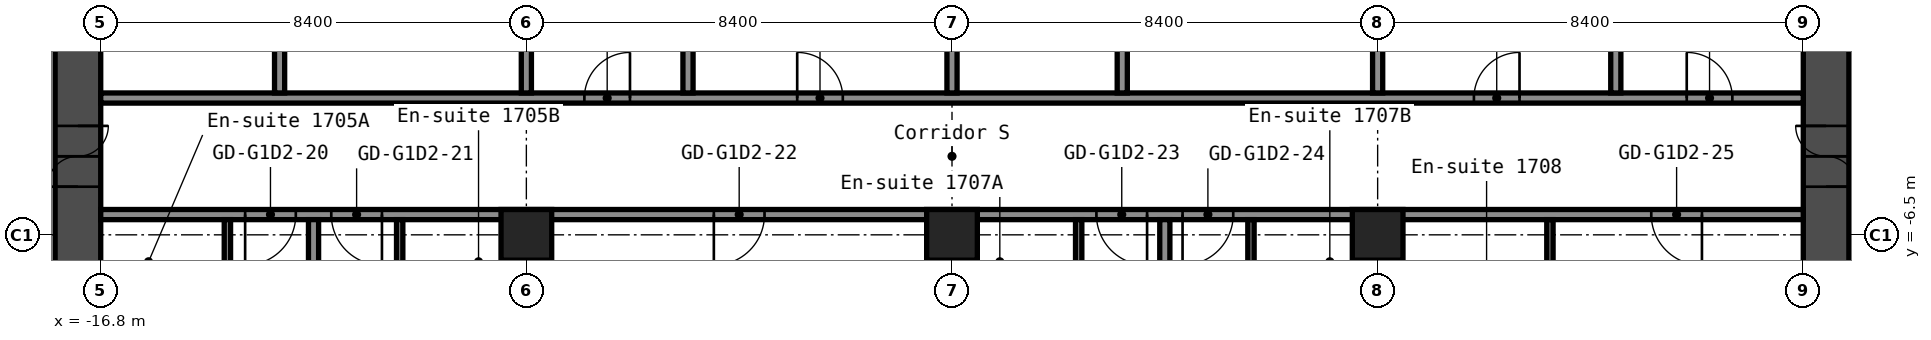
"""IFC4 building model, lengths in metres.
Left out: names, types, materials, properties, quantities, classifications, styles, units other than length and angle.
Written with IfcOpenShell. Run it as: python <this file> out.ifc"""

import sys

from ifc_helpers import new_model, si_unit, direction, frame, frame_2d, origin, origin_2d, place, context, subcontext, project, spatial, rectangle, hollow_rectangle, extrude, element, fill, save


model = new_model("IFC4")
c1 = context("Model", 3, precision=1e-05, world=origin(), true_north=direction((0.0, 1.0)))
c2 = subcontext(c1, "Body", "Model", "MODEL_VIEW")
j1 = project(units=[si_unit("LENGTHUNIT", "METRE"), si_unit("PLANEANGLEUNIT", "RADIAN")], contexts=[c1])
p1 = place(None, origin())
s1 = spatial("IfcSite", under=j1, at=p1, CompositionType="ELEMENT")
p2 = place(p1, origin())
s2 = spatial("IfcBuilding", under=s1, at=p2, CompositionType="ELEMENT")
p3 = place(p2, frame((0.0, 0.0, 61.4)))
s3 = spatial("IfcBuildingStorey", under=s2, at=p3, CompositionType="ELEMENT", Elevation=61.4)
for number, where, z_axis, x_axis in (
    (1, (-8.4, -6.5, 0.0), (0.0, 0.0, 1.0), (1.0, 0.0, 0.0)),
    (2, (0.0, -6.5, 0.0), (0.0, 0.0, 1.0), (1.0, 0.0, 0.0)),
    (3, (8.4, -6.5, 0.0), (0.0, 0.0, 1.0), (1.0, 0.0, 0.0)),
):
    element("IfcColumn", number, at=place(p3, frame(where, z_axis=z_axis, x_axis=x_axis)), inside=s3, PredefinedType="COLUMN", context=c2, shape_type="SweptSolid", body=[
        extrude(hollow_rectangle(XDim=1.0, YDim=1.0, WallThickness=0.04, at=origin_2d()), origin(), (0.0, 0.0, 1.0), 2.9),
    ])
p4 = place(p3, frame((-17.25, -8.4, 0.0), z_axis=(0.0, 0.0, 1.0), x_axis=(0.0, 1.0, 0.0)))
e4 = element("IfcWall", 4, at=p4, inside=s3, PredefinedType="SHEAR", context=c2, shape_type="SweptSolid", body=[
    extrude(rectangle(XDim=16.8, YDim=0.9, at=frame_2d((8.4, 0.0))), origin(), (0.0, 0.0, 1.0), 2.9),
])
p5 = place(p4, frame((12.75, 0.0, 0.0)))
e5 = element("IfcOpeningElement", 5, at=p5, cuts=e4, PredefinedType="OPENING", context=c2, shape_type="SweptSolid", body=[
    extrude(rectangle(XDim=1.2, YDim=2.1, at=frame_2d((0.6, 1.05))), frame((0.0, 0.46, 0.0), z_axis=(0.0, -1.0, 0.0), x_axis=(1.0, 0.0, 0.0)), (0.0, 0.0, 1.0), 0.92),
])
p6 = place(p4, frame((2.85, 0.0, 0.0)))
e6 = element("IfcOpeningElement", 6, at=p6, cuts=e4, PredefinedType="OPENING", context=c2, shape_type="SweptSolid", body=[
    extrude(rectangle(XDim=1.2, YDim=2.1, at=frame_2d((0.6, 1.05))), frame((0.0, 0.46, 0.0), z_axis=(0.0, -1.0, 0.0), x_axis=(1.0, 0.0, 0.0)), (0.0, 0.0, 1.0), 0.92),
])
p7 = place(p3, frame((17.25, -8.4, 0.0), z_axis=(0.0, 0.0, 1.0), x_axis=(0.0, 1.0, 0.0)))
e7 = element("IfcWall", 7, at=p7, inside=s3, PredefinedType="SHEAR", context=c2, shape_type="SweptSolid", body=[
    extrude(rectangle(XDim=16.8, YDim=0.9, at=frame_2d((8.4, 0.0))), origin(), (0.0, 0.0, 1.0), 2.9),
])
p8 = place(p7, frame((12.75, 0.0, 0.0)))
e8 = element("IfcOpeningElement", 8, at=p8, cuts=e7, PredefinedType="OPENING", context=c2, shape_type="SweptSolid", body=[
    extrude(rectangle(XDim=1.2, YDim=2.1, at=frame_2d((0.6, 1.05))), frame((0.0, 0.46, 0.0), z_axis=(0.0, -1.0, 0.0), x_axis=(1.0, 0.0, 0.0)), (0.0, 0.0, 1.0), 0.92),
])
p9 = place(p7, frame((2.85, 0.0, 0.0)))
e9 = element("IfcOpeningElement", 9, at=p9, cuts=e7, PredefinedType="OPENING", context=c2, shape_type="SweptSolid", body=[
    extrude(rectangle(XDim=1.2, YDim=2.1, at=frame_2d((0.6, 1.05))), frame((0.0, 0.46, 0.0), z_axis=(0.0, -1.0, 0.0), x_axis=(1.0, 0.0, 0.0)), (0.0, 0.0, 1.0), 0.92),
])
p10 = place(p3, frame((-16.8, -6.1, 0.0), z_axis=(0.0, 0.0, 1.0), x_axis=(1.0, 0.0, 0.0)))
e10 = element("IfcWall", 10, at=p10, inside=s3, PredefinedType="PARTITIONING", context=c2, shape_type="SweptSolid", body=[
    extrude(rectangle(XDim=33.6, YDim=0.2, at=frame_2d((16.8, 0.0))), origin(), (0.0, 0.0, 1.0), 2.9),
])
p11 = place(p10, frame((2.85, 0.0, 0.0)))
e11 = element("IfcOpeningElement", 11, at=p11, cuts=e10, PredefinedType="OPENING", context=c2, shape_type="SweptSolid", body=[
    extrude(rectangle(XDim=1.0, YDim=2.1, at=frame_2d((0.5, 1.05))), frame((0.0, 0.11, 0.0), z_axis=(0.0, -1.0, 0.0), x_axis=(1.0, 0.0, 0.0)), (0.0, 0.0, 1.0), 0.22),
])
p12 = place(p10, frame((4.55, 0.0, 0.0)))
e12 = element("IfcOpeningElement", 12, at=p12, cuts=e10, PredefinedType="OPENING", context=c2, shape_type="SweptSolid", body=[
    extrude(rectangle(XDim=1.0, YDim=2.1, at=frame_2d((0.5, 1.05))), frame((0.0, 0.11, 0.0), z_axis=(0.0, -1.0, 0.0), x_axis=(1.0, 0.0, 0.0)), (0.0, 0.0, 1.0), 0.22),
])
p13 = place(p10, frame((12.1, 0.0, 0.0)))
e13 = element("IfcOpeningElement", 13, at=p13, cuts=e10, PredefinedType="OPENING", context=c2, shape_type="SweptSolid", body=[
    extrude(rectangle(XDim=1.0, YDim=2.1, at=frame_2d((0.5, 1.05))), frame((0.0, 0.11, 0.0), z_axis=(0.0, -1.0, 0.0), x_axis=(1.0, 0.0, 0.0)), (0.0, 0.0, 1.0), 0.22),
])
p14 = place(p10, frame((19.65, 0.0, 0.0)))
e14 = element("IfcOpeningElement", 14, at=p14, cuts=e10, PredefinedType="OPENING", context=c2, shape_type="SweptSolid", body=[
    extrude(rectangle(XDim=1.0, YDim=2.1, at=frame_2d((0.5, 1.05))), frame((0.0, 0.11, 0.0), z_axis=(0.0, -1.0, 0.0), x_axis=(1.0, 0.0, 0.0)), (0.0, 0.0, 1.0), 0.22),
])
p15 = place(p10, frame((21.35, 0.0, 0.0)))
e15 = element("IfcOpeningElement", 15, at=p15, cuts=e10, PredefinedType="OPENING", context=c2, shape_type="SweptSolid", body=[
    extrude(rectangle(XDim=1.0, YDim=2.1, at=frame_2d((0.5, 1.05))), frame((0.0, 0.11, 0.0), z_axis=(0.0, -1.0, 0.0), x_axis=(1.0, 0.0, 0.0)), (0.0, 0.0, 1.0), 0.22),
])
p16 = place(p10, frame((30.6, 0.0, 0.0)))
e16 = element("IfcOpeningElement", 16, at=p16, cuts=e10, PredefinedType="OPENING", context=c2, shape_type="SweptSolid", body=[
    extrude(rectangle(XDim=1.0, YDim=2.1, at=frame_2d((0.5, 1.05))), frame((0.0, 0.11, 0.0), z_axis=(0.0, -1.0, 0.0), x_axis=(1.0, 0.0, 0.0)), (0.0, 0.0, 1.0), 0.22),
])
p17 = place(p3, frame((-16.8, -3.8, 0.0), z_axis=(0.0, 0.0, 1.0), x_axis=(1.0, 0.0, 0.0)))
e17 = element("IfcWall", 17, at=p17, inside=s3, PredefinedType="PARTITIONING", context=c2, shape_type="SweptSolid", body=[
    extrude(rectangle(XDim=33.6, YDim=0.2, at=frame_2d((16.8, 0.0))), origin(), (0.0, 0.0, 1.0), 2.9),
])
p18 = place(p17, frame((9.545, 0.0, 0.0)))
e18 = element("IfcOpeningElement", 18, at=p18, cuts=e17, PredefinedType="OPENING", context=c2, shape_type="SweptSolid", body=[
    extrude(rectangle(XDim=0.9, YDim=2.1, at=frame_2d((0.45, 1.05))), frame((0.0, 0.11, 0.0), z_axis=(0.0, -1.0, 0.0), x_axis=(1.0, 0.0, 0.0)), (0.0, 0.0, 1.0), 0.22),
])
p19 = place(p17, frame((13.745, 0.0, 0.0)))
e19 = element("IfcOpeningElement", 19, at=p19, cuts=e17, PredefinedType="OPENING", context=c2, shape_type="SweptSolid", body=[
    extrude(rectangle(XDim=0.9, YDim=2.1, at=frame_2d((0.45, 1.05))), frame((0.0, 0.11, 0.0), z_axis=(0.0, -1.0, 0.0), x_axis=(1.0, 0.0, 0.0)), (0.0, 0.0, 1.0), 0.22),
])
p20 = place(p17, frame((27.1, 0.0, 0.0)))
e20 = element("IfcOpeningElement", 20, at=p20, cuts=e17, PredefinedType="OPENING", context=c2, shape_type="SweptSolid", body=[
    extrude(rectangle(XDim=0.9, YDim=2.1, at=frame_2d((0.45, 1.05))), frame((0.0, 0.11, 0.0), z_axis=(0.0, -1.0, 0.0), x_axis=(1.0, 0.0, 0.0)), (0.0, 0.0, 1.0), 0.22),
])
p21 = place(p17, frame((31.3, 0.0, 0.0)))
e21 = element("IfcOpeningElement", 21, at=p21, cuts=e17, PredefinedType="OPENING", context=c2, shape_type="SweptSolid", body=[
    extrude(rectangle(XDim=0.9, YDim=2.1, at=frame_2d((0.45, 1.05))), frame((0.0, 0.11, 0.0), z_axis=(0.0, -1.0, 0.0), x_axis=(1.0, 0.0, 0.0)), (0.0, 0.0, 1.0), 0.22),
])
p22 = place(p3, frame((-14.3, -9.1, 0.0), z_axis=(0.0, 0.0, 1.0), x_axis=(0.0, 1.0, 0.0)))
e22 = element("IfcWall", 22, at=p22, inside=s3, PredefinedType="PARTITIONING", context=c2, shape_type="SweptSolid", body=[
    extrude(rectangle(XDim=2.9, YDim=0.125, at=frame_2d((1.45, 0.0))), origin(), (0.0, 0.0, 1.0), 2.9),
])
p23 = place(p22, frame((0.6, 0.0, 0.0)))
e23 = element("IfcOpeningElement", 23, at=p23, cuts=e22, PredefinedType="OPENING", context=c2, shape_type="SweptSolid", body=[
    extrude(rectangle(XDim=0.8, YDim=2.1, at=frame_2d((0.4, 1.05))), frame((0.0, 0.073, 0.0), z_axis=(0.0, -1.0, 0.0), x_axis=(1.0, 0.0, 0.0)), (0.0, 0.0, 1.0), 0.145),
])
p24 = place(p3, frame((-13.27, -3.7, 0.0), z_axis=(0.0, 0.0, 1.0), x_axis=(0.0, 1.0, 0.0)))
e24 = element("IfcWall", 24, at=p24, inside=s3, PredefinedType="PARTITIONING", context=c2, shape_type="SweptSolid", body=[
    extrude(rectangle(XDim=7.4, YDim=0.2, at=frame_2d((3.7, 0.0))), origin(), (0.0, 0.0, 1.0), 2.9),
])
p25 = place(p3, frame((-12.6, -20.3, 0.0), z_axis=(0.0, 0.0, 1.0), x_axis=(0.0, 1.0, 0.0)))
e25 = element("IfcWall", 25, at=p25, inside=s3, PredefinedType="PARTITIONING", context=c2, shape_type="SweptSolid", body=[
    extrude(rectangle(XDim=14.1, YDim=0.2, at=frame_2d((7.05, 0.0))), origin(), (0.0, 0.0, 1.0), 2.9),
])
p26 = place(p3, frame((-10.9, -9.1, 0.0), z_axis=(0.0, 0.0, 1.0), x_axis=(0.0, 1.0, 0.0)))
e26 = element("IfcWall", 26, at=p26, inside=s3, PredefinedType="PARTITIONING", context=c2, shape_type="SweptSolid", body=[
    extrude(rectangle(XDim=2.9, YDim=0.125, at=frame_2d((1.45, 0.0))), origin(), (0.0, 0.0, 1.0), 2.9),
])
p27 = place(p26, frame((0.6, 0.0, 0.0)))
e27 = element("IfcOpeningElement", 27, at=p27, cuts=e26, PredefinedType="OPENING", context=c2, shape_type="SweptSolid", body=[
    extrude(rectangle(XDim=0.8, YDim=2.1, at=frame_2d((0.4, 1.05))), frame((0.0, 0.073, 0.0), z_axis=(0.0, -1.0, 0.0), x_axis=(1.0, 0.0, 0.0)), (0.0, 0.0, 1.0), 0.145),
])
p28 = place(p3, frame((-8.4, -20.3, 0.0), z_axis=(0.0, 0.0, 1.0), x_axis=(0.0, 1.0, 0.0)))
e28 = element("IfcWall", 28, at=p28, inside=s3, PredefinedType="PARTITIONING", context=c2, shape_type="SweptSolid", body=[
    extrude(rectangle(XDim=13.31, YDim=0.2, at=frame_2d((6.655, 0.0))), origin(), (0.0, 0.0, 1.0), 2.9),
])
for number, where, z_axis, x_axis in (
    (29, (-8.4, -3.7, 0.0), (0.0, 0.0, 1.0), (0.0, 1.0, 0.0)),
    (30, (-5.21, -3.7, 0.0), (0.0, 0.0, 1.0), (0.0, 1.0, 0.0)),
):
    element("IfcWall", number, at=place(p3, frame(where, z_axis=z_axis, x_axis=x_axis)), inside=s3, PredefinedType="PARTITIONING", context=c2, shape_type="SweptSolid", body=[
        extrude(rectangle(XDim=7.4, YDim=0.2, at=frame_2d((3.7, 0.0))), origin(), (0.0, 0.0, 1.0), 2.9),
    ])
p29 = place(p3, frame((0.0, -20.3, 0.0), z_axis=(0.0, 0.0, 1.0), x_axis=(0.0, 1.0, 0.0)))
e31 = element("IfcWall", 31, at=p29, inside=s3, PredefinedType="PARTITIONING", context=c2, shape_type="SweptSolid", body=[
    extrude(rectangle(XDim=13.31, YDim=0.2, at=frame_2d((6.655, 0.0))), origin(), (0.0, 0.0, 1.0), 2.9),
])
p30 = place(p3, frame((0.0, -3.7, 0.0), z_axis=(0.0, 0.0, 1.0), x_axis=(0.0, 1.0, 0.0)))
e32 = element("IfcWall", 32, at=p30, inside=s3, PredefinedType="PARTITIONING", context=c2, shape_type="SweptSolid", body=[
    extrude(rectangle(XDim=7.4, YDim=0.2, at=frame_2d((3.7, 0.0))), origin(), (0.0, 0.0, 1.0), 2.9),
])
p31 = place(p3, frame((2.5, -9.1, 0.0), z_axis=(0.0, 0.0, 1.0), x_axis=(0.0, 1.0, 0.0)))
e33 = element("IfcWall", 33, at=p31, inside=s3, PredefinedType="PARTITIONING", context=c2, shape_type="SweptSolid", body=[
    extrude(rectangle(XDim=2.9, YDim=0.125, at=frame_2d((1.45, 0.0))), origin(), (0.0, 0.0, 1.0), 2.9),
])
p32 = place(p31, frame((0.6, 0.0, 0.0)))
e34 = element("IfcOpeningElement", 34, at=p32, cuts=e33, PredefinedType="OPENING", context=c2, shape_type="SweptSolid", body=[
    extrude(rectangle(XDim=0.8, YDim=2.1, at=frame_2d((0.4, 1.05))), frame((0.0, 0.073, 0.0), z_axis=(0.0, -1.0, 0.0), x_axis=(1.0, 0.0, 0.0)), (0.0, 0.0, 1.0), 0.145),
])
p33 = place(p3, frame((3.36, -3.7, 0.0), z_axis=(0.0, 0.0, 1.0), x_axis=(0.0, 1.0, 0.0)))
e35 = element("IfcWall", 35, at=p33, inside=s3, PredefinedType="PARTITIONING", context=c2, shape_type="SweptSolid", body=[
    extrude(rectangle(XDim=7.4, YDim=0.2, at=frame_2d((3.7, 0.0))), origin(), (0.0, 0.0, 1.0), 2.9),
])
p34 = place(p3, frame((4.2, -20.3, 0.0), z_axis=(0.0, 0.0, 1.0), x_axis=(0.0, 1.0, 0.0)))
e36 = element("IfcWall", 36, at=p34, inside=s3, PredefinedType="PARTITIONING", context=c2, shape_type="SweptSolid", body=[
    extrude(rectangle(XDim=14.1, YDim=0.2, at=frame_2d((7.05, 0.0))), origin(), (0.0, 0.0, 1.0), 2.9),
])
p35 = place(p3, frame((5.9, -9.1, 0.0), z_axis=(0.0, 0.0, 1.0), x_axis=(0.0, 1.0, 0.0)))
e37 = element("IfcWall", 37, at=p35, inside=s3, PredefinedType="PARTITIONING", context=c2, shape_type="SweptSolid", body=[
    extrude(rectangle(XDim=2.9, YDim=0.125, at=frame_2d((1.45, 0.0))), origin(), (0.0, 0.0, 1.0), 2.9),
])
p36 = place(p35, frame((0.6, 0.0, 0.0)))
e38 = element("IfcOpeningElement", 38, at=p36, cuts=e37, PredefinedType="OPENING", context=c2, shape_type="SweptSolid", body=[
    extrude(rectangle(XDim=0.8, YDim=2.1, at=frame_2d((0.4, 1.05))), frame((0.0, 0.073, 0.0), z_axis=(0.0, -1.0, 0.0), x_axis=(1.0, 0.0, 0.0)), (0.0, 0.0, 1.0), 0.145),
])
p37 = place(p3, frame((8.4, -20.3, 0.0), z_axis=(0.0, 0.0, 1.0), x_axis=(0.0, 1.0, 0.0)))
e39 = element("IfcWall", 39, at=p37, inside=s3, PredefinedType="PARTITIONING", context=c2, shape_type="SweptSolid", body=[
    extrude(rectangle(XDim=13.31, YDim=0.2, at=frame_2d((6.655, 0.0))), origin(), (0.0, 0.0, 1.0), 2.9),
])
p38 = place(p3, frame((8.4, -3.7, 0.0), z_axis=(0.0, 0.0, 1.0), x_axis=(0.0, 1.0, 0.0)))
e40 = element("IfcWall", 40, at=p38, inside=s3, PredefinedType="PARTITIONING", context=c2, shape_type="SweptSolid", body=[
    extrude(rectangle(XDim=7.4, YDim=0.2, at=frame_2d((3.7, 0.0))), origin(), (0.0, 0.0, 1.0), 2.9),
])
p39 = place(p3, frame((11.8, -9.5, 0.0), z_axis=(0.0, 0.0, 1.0), x_axis=(0.0, 1.0, 0.0)))
e41 = element("IfcWall", 41, at=p39, inside=s3, PredefinedType="PARTITIONING", context=c2, shape_type="SweptSolid", body=[
    extrude(rectangle(XDim=3.3, YDim=0.125, at=frame_2d((1.65, 0.0))), origin(), (0.0, 0.0, 1.0), 2.9),
])
p40 = place(p3, frame((13.1, -3.7, 0.0), z_axis=(0.0, 0.0, 1.0), x_axis=(0.0, 1.0, 0.0)))
e42 = element("IfcWall", 42, at=p40, inside=s3, PredefinedType="PARTITIONING", context=c2, shape_type="SweptSolid", body=[
    extrude(rectangle(XDim=7.4, YDim=0.2, at=frame_2d((3.7, 0.0))), origin(), (0.0, 0.0, 1.0), 2.9),
])
p41 = place(p6, origin())
e43 = element("IfcDoor", 43, at=p41, inside=s3, OperationType="DOUBLE_DOOR_SINGLE_SWING", PredefinedType="DOOR", context=c2, shape_type="SweptSolid", body=[
    extrude(rectangle(XDim=1.2, YDim=2.1, at=frame_2d((0.6, 1.05))), frame((0.0, 0.025, 0.0), z_axis=(0.0, -1.0, 0.0), x_axis=(1.0, 0.0, 0.0)), (0.0, 0.0, 1.0), 0.05),
])
fill(e6, e43)
p42 = place(p9, origin())
e44 = element("IfcDoor", 44, at=p42, inside=s3, OperationType="DOUBLE_DOOR_SINGLE_SWING", PredefinedType="DOOR", context=c2, shape_type="SweptSolid", body=[
    extrude(rectangle(XDim=1.2, YDim=2.1, at=frame_2d((0.6, 1.05))), frame((0.0, 0.025, 0.0), z_axis=(0.0, -1.0, 0.0), x_axis=(1.0, 0.0, 0.0)), (0.0, 0.0, 1.0), 0.05),
])
fill(e9, e44)
p43 = place(p11, origin())
e45 = element("IfcDoor", 45, at=p43, inside=s3, OperationType="SINGLE_SWING_LEFT", PredefinedType="DOOR", context=c2, shape_type="SweptSolid", body=[
    extrude(rectangle(XDim=1.0, YDim=2.1, at=frame_2d((0.5, 1.05))), frame((0.0, 0.025, 0.0), z_axis=(0.0, -1.0, 0.0), x_axis=(1.0, 0.0, 0.0)), (0.0, 0.0, 1.0), 0.05),
])
fill(e11, e45)
p44 = place(p12, origin())
e46 = element("IfcDoor", 46, at=p44, inside=s3, OperationType="SINGLE_SWING_RIGHT", PredefinedType="DOOR", context=c2, shape_type="SweptSolid", body=[
    extrude(rectangle(XDim=1.0, YDim=2.1, at=frame_2d((0.5, 1.05))), frame((0.0, 0.025, 0.0), z_axis=(0.0, -1.0, 0.0), x_axis=(1.0, 0.0, 0.0)), (0.0, 0.0, 1.0), 0.05),
])
fill(e12, e46)
p45 = place(p13, origin())
e47 = element("IfcDoor", 47, at=p45, inside=s3, OperationType="SINGLE_SWING_LEFT", PredefinedType="DOOR", context=c2, shape_type="SweptSolid", body=[
    extrude(rectangle(XDim=1.0, YDim=2.1, at=frame_2d((0.5, 1.05))), frame((0.0, 0.025, 0.0), z_axis=(0.0, -1.0, 0.0), x_axis=(1.0, 0.0, 0.0)), (0.0, 0.0, 1.0), 0.05),
])
fill(e13, e47)
p46 = place(p14, origin())
e48 = element("IfcDoor", 48, at=p46, inside=s3, OperationType="SINGLE_SWING_RIGHT", PredefinedType="DOOR", context=c2, shape_type="SweptSolid", body=[
    extrude(rectangle(XDim=1.0, YDim=2.1, at=frame_2d((0.5, 1.05))), frame((0.0, 0.025, 0.0), z_axis=(0.0, -1.0, 0.0), x_axis=(1.0, 0.0, 0.0)), (0.0, 0.0, 1.0), 0.05),
])
fill(e14, e48)
p47 = place(p15, origin())
e49 = element("IfcDoor", 49, at=p47, inside=s3, OperationType="SINGLE_SWING_LEFT", PredefinedType="DOOR", context=c2, shape_type="SweptSolid", body=[
    extrude(rectangle(XDim=1.0, YDim=2.1, at=frame_2d((0.5, 1.05))), frame((0.0, 0.025, 0.0), z_axis=(0.0, -1.0, 0.0), x_axis=(1.0, 0.0, 0.0)), (0.0, 0.0, 1.0), 0.05),
])
fill(e15, e49)
p48 = place(p16, origin())
e50 = element("IfcDoor", 50, at=p48, inside=s3, OperationType="SINGLE_SWING_RIGHT", PredefinedType="DOOR", context=c2, shape_type="SweptSolid", body=[
    extrude(rectangle(XDim=1.0, YDim=2.1, at=frame_2d((0.5, 1.05))), frame((0.0, 0.025, 0.0), z_axis=(0.0, -1.0, 0.0), x_axis=(1.0, 0.0, 0.0)), (0.0, 0.0, 1.0), 0.05),
])
fill(e16, e50)
p49 = place(p18, origin())
e51 = element("IfcDoor", 51, at=p49, inside=s3, OperationType="SINGLE_SWING_LEFT", PredefinedType="DOOR", context=c2, shape_type="SweptSolid", body=[
    extrude(rectangle(XDim=0.9, YDim=2.1, at=frame_2d((0.45, 1.05))), frame((0.0, 0.025, 0.0), z_axis=(0.0, -1.0, 0.0), x_axis=(1.0, 0.0, 0.0)), (0.0, 0.0, 1.0), 0.05),
])
fill(e18, e51)
p50 = place(p19, origin())
e52 = element("IfcDoor", 52, at=p50, inside=s3, OperationType="SINGLE_SWING_RIGHT", PredefinedType="DOOR", context=c2, shape_type="SweptSolid", body=[
    extrude(rectangle(XDim=0.9, YDim=2.1, at=frame_2d((0.45, 1.05))), frame((0.0, 0.025, 0.0), z_axis=(0.0, -1.0, 0.0), x_axis=(1.0, 0.0, 0.0)), (0.0, 0.0, 1.0), 0.05),
])
fill(e19, e52)
p51 = place(p20, origin())
e53 = element("IfcDoor", 53, at=p51, inside=s3, OperationType="SINGLE_SWING_LEFT", PredefinedType="DOOR", context=c2, shape_type="SweptSolid", body=[
    extrude(rectangle(XDim=0.9, YDim=2.1, at=frame_2d((0.45, 1.05))), frame((0.0, 0.025, 0.0), z_axis=(0.0, -1.0, 0.0), x_axis=(1.0, 0.0, 0.0)), (0.0, 0.0, 1.0), 0.05),
])
fill(e20, e53)
p52 = place(p21, origin())
e54 = element("IfcDoor", 54, at=p52, inside=s3, OperationType="SINGLE_SWING_RIGHT", PredefinedType="DOOR", context=c2, shape_type="SweptSolid", body=[
    extrude(rectangle(XDim=0.9, YDim=2.1, at=frame_2d((0.45, 1.05))), frame((0.0, 0.025, 0.0), z_axis=(0.0, -1.0, 0.0), x_axis=(1.0, 0.0, 0.0)), (0.0, 0.0, 1.0), 0.05),
])
fill(e21, e54)
save(model, sys.argv[1])
